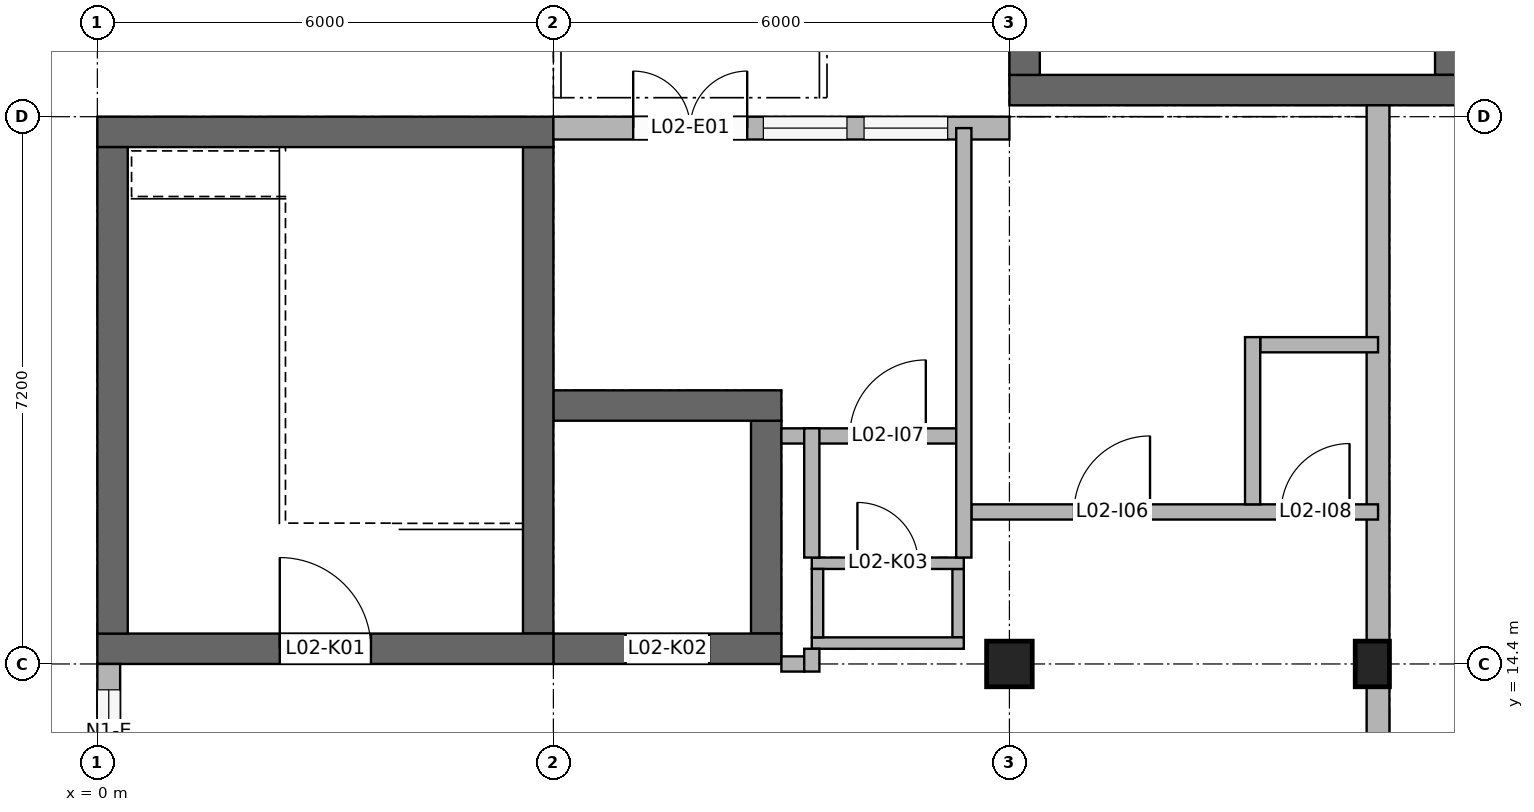
"""IFC4 building model, lengths in metres.
Left out: names, types, materials, properties, quantities, classifications, styles, units other than length and angle.
Written with IfcOpenShell. Run it as: python <this file> out.ifc"""

import sys

from ifc_helpers import new_model, si_unit, direction, frame, frame_2d, origin, origin_2d, place, context, subcontext, project, spatial, rectangle, extrude, element, fill, save


model = new_model("IFC4")
c1 = context("Model", 3, precision=1e-05, world=origin(), true_north=direction((0.0, 1.0)))
c2 = subcontext(c1, "Body", "Model", "MODEL_VIEW")
j1 = project(units=[si_unit("LENGTHUNIT", "METRE"), si_unit("PLANEANGLEUNIT", "RADIAN")], contexts=[c1])
p1 = place(None, origin())
s1 = spatial("IfcSite", under=j1, at=p1, CompositionType="ELEMENT")
p2 = place(p1, origin())
s2 = spatial("IfcBuilding", under=s1, at=p2, CompositionType="ELEMENT")
p3 = place(p2, frame((0.0, 0.0, 8.4)))
s3 = spatial("IfcBuildingStorey", under=s2, at=p3, CompositionType="ELEMENT", Elevation=8.4)
p4 = place(p3, frame((0.0, 14.6, 0.0), z_axis=(0.0, 0.0, 1.0), x_axis=(1.0, 0.0, 0.0)))
e1 = element("IfcWall", 1, at=p4, inside=s3, PredefinedType="SHEAR", context=c2, shape_type="SweptSolid", body=[
    extrude(rectangle(XDim=6.0, YDim=0.4, at=frame_2d((3.0, 0.0))), origin(), (0.0, 0.0, 1.0), 3.95),
])
p5 = place(p4, frame((2.4, 0.0, 0.0)))
e2 = element("IfcOpeningElement", 2, at=p5, cuts=e1, PredefinedType="OPENING", context=c2, shape_type="SweptSolid", body=[
    extrude(rectangle(XDim=1.2, YDim=2.1, at=frame_2d((0.6, 1.05))), frame((0.0, 0.21, 0.0), z_axis=(0.0, -1.0, 0.0), x_axis=(1.0, 0.0, 0.0)), (0.0, 0.0, 1.0), 0.42),
])
p6 = place(p3, frame((0.0, 21.4, 0.0), z_axis=(0.0, 0.0, 1.0), x_axis=(1.0, 0.0, 0.0)))
e3 = element("IfcWall", 3, at=p6, inside=s3, PredefinedType="SHEAR", context=c2, shape_type="SweptSolid", body=[
    extrude(rectangle(XDim=6.0, YDim=0.4, at=frame_2d((3.0, 0.0))), origin(), (0.0, 0.0, 1.0), 3.95),
])
for number, where, z_axis, x_axis in (
    (4, (0.2, 14.8, 0.0), (0.0, 0.0, 1.0), (0.0, 1.0, 0.0)),
    (5, (5.8, 14.8, 0.0), (0.0, 0.0, 1.0), (0.0, 1.0, 0.0)),
):
    element("IfcWall", number, at=place(p3, frame(where, z_axis=z_axis, x_axis=x_axis)), inside=s3, PredefinedType="SHEAR", context=c2, shape_type="SweptSolid", body=[
        extrude(rectangle(XDim=6.4, YDim=0.4, at=frame_2d((3.2, 0.0))), origin(), (0.0, 0.0, 1.0), 3.95),
    ])
p7 = place(p3, frame((6.0, 14.6, 0.0), z_axis=(0.0, 0.0, 1.0), x_axis=(1.0, 0.0, 0.0)))
e6 = element("IfcWall", 6, at=p7, inside=s3, PredefinedType="SHEAR", context=c2, shape_type="SweptSolid", body=[
    extrude(rectangle(XDim=3.0, YDim=0.4, at=frame_2d((1.5, 0.0))), origin(), (0.0, 0.0, 1.0), 5.75),
])
p8 = place(p7, frame((0.95, 0.0, 0.0)))
e7 = element("IfcOpeningElement", 7, at=p8, cuts=e6, PredefinedType="OPENING", context=c2, shape_type="SweptSolid", body=[
    extrude(rectangle(XDim=1.1, YDim=2.1, at=frame_2d((0.55, 1.05))), frame((0.0, 0.21, 0.0), z_axis=(0.0, -1.0, 0.0), x_axis=(1.0, 0.0, 0.0)), (0.0, 0.0, 1.0), 0.42),
])
p9 = place(p3, frame((6.0, 17.8, 0.0), z_axis=(0.0, 0.0, 1.0), x_axis=(1.0, 0.0, 0.0)))
e8 = element("IfcWall", 8, at=p9, inside=s3, PredefinedType="SHEAR", context=c2, shape_type="SweptSolid", body=[
    extrude(rectangle(XDim=3.0, YDim=0.4, at=frame_2d((1.5, 0.0))), origin(), (0.0, 0.0, 1.0), 5.75),
])
p10 = place(p3, frame((8.8, 14.8, 0.0), z_axis=(0.0, 0.0, 1.0), x_axis=(0.0, 1.0, 0.0)))
e9 = element("IfcWall", 9, at=p10, inside=s3, PredefinedType="SHEAR", context=c2, shape_type="SweptSolid", body=[
    extrude(rectangle(XDim=2.8, YDim=0.4, at=frame_2d((1.4, 0.0))), origin(), (0.0, 0.0, 1.0), 5.75),
])
p11 = place(p3, frame((12.0, 21.95, 0.0), z_axis=(0.0, 0.0, 1.0), x_axis=(1.0, 0.0, 0.0)))
e10 = element("IfcWall", 10, at=p11, inside=s3, PredefinedType="SHEAR", context=c2, shape_type="SweptSolid", body=[
    extrude(rectangle(XDim=6.0, YDim=0.4, at=frame_2d((3.0, 0.0))), origin(), (0.0, 0.0, 1.0), 3.78),
])
p12 = place(p3, frame((12.2, 22.15, 0.0), z_axis=(0.0, 0.0, 1.0), x_axis=(0.0, 1.0, 0.0)))
e11 = element("IfcWall", 11, at=p12, inside=s3, PredefinedType="SHEAR", context=c2, shape_type="SweptSolid", body=[
    extrude(rectangle(XDim=6.25, YDim=0.4, at=frame_2d((3.125, 0.0))), origin(), (0.0, 0.0, 1.0), 3.78),
])
p13 = place(p3, frame((17.8, 22.15, 0.0), z_axis=(0.0, 0.0, 1.0), x_axis=(0.0, 1.0, 0.0)))
e12 = element("IfcWall", 12, at=p13, inside=s3, PredefinedType="SHEAR", context=c2, shape_type="SweptSolid", body=[
    extrude(rectangle(XDim=6.25, YDim=0.4, at=frame_2d((3.125, 0.0))), origin(), (0.0, 0.0, 1.0), 3.78),
])
p14 = place(p13, frame((0.975, 0.0, 0.0)))
e13 = element("IfcOpeningElement", 13, at=p14, cuts=e12, PredefinedType="OPENING", context=c2, shape_type="SweptSolid", body=[
    extrude(rectangle(XDim=1.2, YDim=2.1, at=frame_2d((0.6, 1.05))), frame((0.0, 0.21, 0.0), z_axis=(0.0, -1.0, 0.0), x_axis=(1.0, 0.0, 0.0)), (0.0, 0.0, 1.0), 0.42),
])
p15 = place(p3, frame((9.4, 14.675, 0.0), z_axis=(0.0, 0.0, 1.0), x_axis=(1.0, 0.0, 0.0)))
e14 = element("IfcWall", 14, at=p15, inside=s3, PredefinedType="SOLIDWALL", context=c2, shape_type="SweptSolid", body=[
    extrude(rectangle(XDim=2.0, YDim=0.15, at=frame_2d((1.0, 0.0))), origin(), (0.0, 0.0, 1.0), 3.95),
])
p16 = place(p3, frame((9.4, 15.725, 0.0), z_axis=(0.0, 0.0, 1.0), x_axis=(1.0, 0.0, 0.0)))
e15 = element("IfcWall", 15, at=p16, inside=s3, PredefinedType="SOLIDWALL", context=c2, shape_type="SweptSolid", body=[
    extrude(rectangle(XDim=2.0, YDim=0.15, at=frame_2d((1.0, 0.0))), origin(), (0.0, 0.0, 1.0), 3.95),
])
p17 = place(p16, frame((0.6, 0.0, 0.0)))
e16 = element("IfcOpeningElement", 16, at=p17, cuts=e15, PredefinedType="OPENING", context=c2, shape_type="SweptSolid", body=[
    extrude(rectangle(XDim=0.8, YDim=2.1, at=frame_2d((0.4, 1.05))), frame((0.0, 0.085, 0.0), z_axis=(0.0, -1.0, 0.0), x_axis=(1.0, 0.0, 0.0)), (0.0, 0.0, 1.0), 0.17),
])
for number, where, z_axis, x_axis in (
    (17, (9.475, 14.75, 0.0), (0.0, 0.0, 1.0), (0.0, 1.0, 0.0)),
    (18, (11.325, 14.75, 0.0), (0.0, 0.0, 1.0), (0.0, 1.0, 0.0)),
):
    element("IfcWall", number, at=place(p3, frame(where, z_axis=z_axis, x_axis=x_axis)), inside=s3, PredefinedType="SOLIDWALL", context=c2, shape_type="SweptSolid", body=[
        extrude(rectangle(XDim=0.9, YDim=0.15, at=frame_2d((0.45, 0.0))), origin(), (0.0, 0.0, 1.0), 3.95),
    ])
p18 = place(p3, frame((12.0, 14.4, 0.0), z_axis=(0.0, 0.0, 1.0), x_axis=(1.0, 0.0, 0.0)))
e19 = element("IfcColumn", 19, at=p18, inside=s3, PredefinedType="COLUMN", context=c2, shape_type="SweptSolid", body=[
    extrude(rectangle(XDim=0.6, YDim=0.6, at=origin_2d()), origin(), (0.0, 0.0, 1.0), 3.95),
])
p19 = place(p3, frame((16.775, 14.4, 0.0), z_axis=(0.0, 0.0, 1.0), x_axis=(1.0, 0.0, 0.0)))
e20 = element("IfcColumn", 20, at=p19, inside=s3, PredefinedType="COLUMN", context=c2, shape_type="SweptSolid", body=[
    extrude(rectangle(XDim=0.45, YDim=0.6, at=origin_2d()), origin(), (0.0, 0.0, 1.0), 3.95),
])
p20 = place(p3, frame((0.15, 7.5, 0.0), z_axis=(0.0, 0.0, 1.0), x_axis=(0.0, 1.0, 0.0)))
e21 = element("IfcWall", 21, at=p20, inside=s3, PredefinedType="SOLIDWALL", context=c2, shape_type="SweptSolid", body=[
    extrude(rectangle(XDim=6.9, YDim=0.3, at=frame_2d((3.45, 0.0))), origin(), (0.0, 0.0, 1.0), 3.05),
])
p21 = place(p20, frame((0.283, 0.0, 0.9)))
e22 = element("IfcOpeningElement", 22, at=p21, cuts=e21, PredefinedType="OPENING", context=c2, shape_type="SweptSolid", body=[
    extrude(rectangle(XDim=1.1, YDim=1.5, at=frame_2d((0.55, 0.75))), frame((0.0, 0.16, 0.0), z_axis=(0.0, -1.0, 0.0), x_axis=(1.0, 0.0, 0.0)), (0.0, 0.0, 1.0), 0.32),
])
p22 = place(p20, frame((1.95, 0.0, 0.9)))
e23 = element("IfcOpeningElement", 23, at=p22, cuts=e21, PredefinedType="OPENING", context=c2, shape_type="SweptSolid", body=[
    extrude(rectangle(XDim=1.1, YDim=1.5, at=frame_2d((0.55, 0.75))), frame((0.0, 0.16, 0.0), z_axis=(0.0, -1.0, 0.0), x_axis=(1.0, 0.0, 0.0)), (0.0, 0.0, 1.0), 0.32),
])
p23 = place(p20, frame((3.617, 0.0, 0.9)))
e24 = element("IfcOpeningElement", 24, at=p23, cuts=e21, PredefinedType="OPENING", context=c2, shape_type="SweptSolid", body=[
    extrude(rectangle(XDim=1.1, YDim=1.5, at=frame_2d((0.55, 0.75))), frame((0.0, 0.16, 0.0), z_axis=(0.0, -1.0, 0.0), x_axis=(1.0, 0.0, 0.0)), (0.0, 0.0, 1.0), 0.32),
])
p24 = place(p20, frame((5.46, 0.0, 0.9)))
e25 = element("IfcOpeningElement", 25, at=p24, cuts=e21, PredefinedType="OPENING", context=c2, shape_type="SweptSolid", body=[
    extrude(rectangle(XDim=1.1, YDim=1.5, at=frame_2d((0.55, 0.75))), frame((0.0, 0.16, 0.0), z_axis=(0.0, -1.0, 0.0), x_axis=(1.0, 0.0, 0.0)), (0.0, 0.0, 1.0), 0.32),
])
p25 = place(p3, frame((16.85, 7.2, 0.0), z_axis=(0.0, 0.0, 1.0), x_axis=(0.0, 1.0, 0.0)))
e26 = element("IfcWall", 26, at=p25, inside=s3, PredefinedType="SOLIDWALL", context=c2, shape_type="SweptSolid", body=[
    extrude(rectangle(XDim=6.9, YDim=0.3, at=frame_2d((3.45, 0.0))), origin(), (0.0, 0.0, 1.0), 3.15),
])
p26 = place(p3, frame((16.85, 14.7, 0.0), z_axis=(0.0, 0.0, 1.0), x_axis=(0.0, 1.0, 0.0)))
e27 = element("IfcWall", 27, at=p26, inside=s3, PredefinedType="SOLIDWALL", context=c2, shape_type="SweptSolid", body=[
    extrude(rectangle(XDim=7.05, YDim=0.3, at=frame_2d((3.525, 0.0))), origin(), (0.0, 0.0, 1.0), 3.05),
])
p27 = place(p3, frame((6.0, 21.45, 0.0), z_axis=(0.0, 0.0, 1.0), x_axis=(1.0, 0.0, 0.0)))
e28 = element("IfcWall", 28, at=p27, inside=s3, PredefinedType="SOLIDWALL", context=c2, shape_type="SweptSolid", body=[
    extrude(rectangle(XDim=6.0, YDim=0.3, at=frame_2d((3.0, 0.0))), origin(), (0.0, 0.0, 1.0), 3.95),
])
p28 = place(p27, frame((1.05, 0.0, 0.0)))
e29 = element("IfcOpeningElement", 29, at=p28, cuts=e28, PredefinedType="OPENING", context=c2, shape_type="SweptSolid", body=[
    extrude(rectangle(XDim=1.5, YDim=2.4, at=frame_2d((0.75, 1.2))), frame((0.0, 0.16, 0.0), z_axis=(0.0, -1.0, 0.0), x_axis=(1.0, 0.0, 0.0)), (0.0, 0.0, 1.0), 0.32),
])
p29 = place(p27, frame((2.762, 0.0, 0.9)))
e30 = element("IfcOpeningElement", 30, at=p29, cuts=e28, PredefinedType="OPENING", context=c2, shape_type="SweptSolid", body=[
    extrude(rectangle(XDim=1.1, YDim=1.5, at=frame_2d((0.55, 0.75))), frame((0.0, 0.16, 0.0), z_axis=(0.0, -1.0, 0.0), x_axis=(1.0, 0.0, 0.0)), (0.0, 0.0, 1.0), 0.32),
])
p30 = place(p27, frame((4.087, 0.0, 0.9)))
e31 = element("IfcOpeningElement", 31, at=p30, cuts=e28, PredefinedType="OPENING", context=c2, shape_type="SweptSolid", body=[
    extrude(rectangle(XDim=1.1, YDim=1.5, at=frame_2d((0.55, 0.75))), frame((0.0, 0.16, 0.0), z_axis=(0.0, -1.0, 0.0), x_axis=(1.0, 0.0, 0.0)), (0.0, 0.0, 1.0), 0.32),
])
p31 = place(p3, frame((9.4, 14.3, 0.0), z_axis=(0.0, 0.0, 1.0), x_axis=(0.0, 1.0, 0.0)))
e32 = element("IfcWall", 32, at=p31, inside=s3, PredefinedType="PARTITIONING", context=c2, shape_type="SweptSolid", body=[
    extrude(rectangle(XDim=0.3, YDim=0.2, at=frame_2d((0.15, 0.0))), origin(), (0.0, 0.0, 1.0), 3.25),
])
p32 = place(p3, frame((9.4, 15.8, 0.0), z_axis=(0.0, 0.0, 1.0), x_axis=(0.0, 1.0, 0.0)))
e33 = element("IfcWall", 33, at=p32, inside=s3, PredefinedType="PARTITIONING", context=c2, shape_type="SweptSolid", body=[
    extrude(rectangle(XDim=1.7, YDim=0.2, at=frame_2d((0.85, 0.0))), origin(), (0.0, 0.0, 1.0), 3.95),
])
p33 = place(p3, frame((11.4, 15.8, 0.0), z_axis=(0.0, 0.0, 1.0), x_axis=(0.0, 1.0, 0.0)))
e34 = element("IfcWall", 34, at=p33, inside=s3, PredefinedType="PARTITIONING", context=c2, shape_type="SweptSolid", body=[
    extrude(rectangle(XDim=5.65, YDim=0.2, at=frame_2d((2.825, 0.0))), origin(), (0.0, 0.0, 1.0), 3.95),
])
p34 = place(p3, frame((15.2, 16.5, 0.0), z_axis=(0.0, 0.0, 1.0), x_axis=(0.0, 1.0, 0.0)))
e35 = element("IfcWall", 35, at=p34, inside=s3, PredefinedType="PARTITIONING", context=c2, shape_type="SweptSolid", body=[
    extrude(rectangle(XDim=2.2, YDim=0.2, at=frame_2d((1.1, 0.0))), origin(), (0.0, 0.0, 1.0), 3.95),
])
p35 = place(p3, frame((9.0, 14.4, 0.0), z_axis=(0.0, 0.0, 1.0), x_axis=(1.0, 0.0, 0.0)))
e36 = element("IfcWall", 36, at=p35, inside=s3, PredefinedType="PARTITIONING", context=c2, shape_type="SweptSolid", body=[
    extrude(rectangle(XDim=0.3, YDim=0.2, at=frame_2d((0.15, 0.0))), origin(), (0.0, 0.0, 1.0), 3.25),
])
p36 = place(p3, frame((11.5, 16.4, 0.0), z_axis=(0.0, 0.0, 1.0), x_axis=(1.0, 0.0, 0.0)))
e37 = element("IfcWall", 37, at=p36, inside=s3, PredefinedType="PARTITIONING", context=c2, shape_type="SweptSolid", body=[
    extrude(rectangle(XDim=5.35, YDim=0.2, at=frame_2d((2.675, 0.0))), origin(), (0.0, 0.0, 1.0), 3.05),
])
p37 = place(p36, frame((1.35, 0.0, 0.0)))
e38 = element("IfcOpeningElement", 38, at=p37, cuts=e37, PredefinedType="OPENING", context=c2, shape_type="SweptSolid", body=[
    extrude(rectangle(XDim=1.0, YDim=2.1, at=frame_2d((0.5, 1.05))), frame((0.0, 0.11, 0.0), z_axis=(0.0, -1.0, 0.0), x_axis=(1.0, 0.0, 0.0)), (0.0, 0.0, 1.0), 0.22),
])
p38 = place(p36, frame((4.075, 0.0, 0.0)))
e39 = element("IfcOpeningElement", 39, at=p38, cuts=e37, PredefinedType="OPENING", context=c2, shape_type="SweptSolid", body=[
    extrude(rectangle(XDim=0.9, YDim=2.1, at=frame_2d((0.45, 1.05))), frame((0.0, 0.11, 0.0), z_axis=(0.0, -1.0, 0.0), x_axis=(1.0, 0.0, 0.0)), (0.0, 0.0, 1.0), 0.22),
])
p39 = place(p3, frame((9.0, 17.4, 0.0), z_axis=(0.0, 0.0, 1.0), x_axis=(1.0, 0.0, 0.0)))
e40 = element("IfcWall", 40, at=p39, inside=s3, PredefinedType="PARTITIONING", context=c2, shape_type="SweptSolid", body=[
    extrude(rectangle(XDim=2.3, YDim=0.2, at=frame_2d((1.15, 0.0))), origin(), (0.0, 0.0, 1.0), 3.95),
])
p40 = place(p39, frame((0.9, 0.0, 0.0)))
e41 = element("IfcOpeningElement", 41, at=p40, cuts=e40, PredefinedType="OPENING", context=c2, shape_type="SweptSolid", body=[
    extrude(rectangle(XDim=1.0, YDim=2.1, at=frame_2d((0.5, 1.05))), frame((0.0, 0.11, 0.0), z_axis=(0.0, -1.0, 0.0), x_axis=(1.0, 0.0, 0.0)), (0.0, 0.0, 1.0), 0.22),
])
p41 = place(p3, frame((15.3, 18.6, 0.0), z_axis=(0.0, 0.0, 1.0), x_axis=(1.0, 0.0, 0.0)))
e42 = element("IfcWall", 42, at=p41, inside=s3, PredefinedType="PARTITIONING", context=c2, shape_type="SweptSolid", body=[
    extrude(rectangle(XDim=1.55, YDim=0.2, at=frame_2d((0.775, 0.0))), origin(), (0.0, 0.0, 1.0), 3.05),
])
p42 = place(p24, origin())
e43 = element("IfcWindow", 43, at=p42, inside=s3, PartitioningType="SINGLE_PANEL", PredefinedType="WINDOW", context=c2, shape_type="SweptSolid", body=[
    extrude(rectangle(XDim=1.1, YDim=1.5, at=frame_2d((0.55, 0.75))), frame((0.0, 0.03, 0.0), z_axis=(0.0, -1.0, 0.0), x_axis=(1.0, 0.0, 0.0)), (0.0, 0.0, 1.0), 0.06),
])
fill(e25, e43)
p43 = place(p28, origin())
e44 = element("IfcDoor", 44, at=p43, inside=s3, OperationType="DOUBLE_DOOR_SINGLE_SWING", PredefinedType="DOOR", context=c2, shape_type="SweptSolid", body=[
    extrude(rectangle(XDim=1.5, YDim=2.4, at=frame_2d((0.75, 1.2))), frame((0.0, 0.025, 0.0), z_axis=(0.0, -1.0, 0.0), x_axis=(1.0, 0.0, 0.0)), (0.0, 0.0, 1.0), 0.05),
])
fill(e29, e44)
p44 = place(p29, origin())
e45 = element("IfcWindow", 45, at=p44, inside=s3, PartitioningType="SINGLE_PANEL", PredefinedType="WINDOW", context=c2, shape_type="SweptSolid", body=[
    extrude(rectangle(XDim=1.1, YDim=1.5, at=frame_2d((0.55, 0.75))), frame((0.0, 0.03, 0.0), z_axis=(0.0, -1.0, 0.0), x_axis=(1.0, 0.0, 0.0)), (0.0, 0.0, 1.0), 0.06),
])
fill(e30, e45)
p45 = place(p30, origin())
e46 = element("IfcWindow", 46, at=p45, inside=s3, PartitioningType="SINGLE_PANEL", PredefinedType="WINDOW", context=c2, shape_type="SweptSolid", body=[
    extrude(rectangle(XDim=1.1, YDim=1.5, at=frame_2d((0.55, 0.75))), frame((0.0, 0.03, 0.0), z_axis=(0.0, -1.0, 0.0), x_axis=(1.0, 0.0, 0.0)), (0.0, 0.0, 1.0), 0.06),
])
fill(e31, e46)
p46 = place(p5, origin())
e47 = element("IfcDoor", 47, at=p46, inside=s3, OperationType="SINGLE_SWING_LEFT", PredefinedType="DOOR", context=c2, shape_type="SweptSolid", body=[
    extrude(rectangle(XDim=1.2, YDim=2.1, at=frame_2d((0.6, 1.05))), frame((0.0, 0.025, 0.0), z_axis=(0.0, -1.0, 0.0), x_axis=(1.0, 0.0, 0.0)), (0.0, 0.0, 1.0), 0.05),
])
fill(e2, e47)
p47 = place(p8, origin())
e48 = element("IfcDoor", 48, at=p47, inside=s3, OperationType="DOUBLE_DOOR_SLIDING", PredefinedType="DOOR", context=c2, shape_type="SweptSolid", body=[
    extrude(rectangle(XDim=1.1, YDim=2.1, at=frame_2d((0.55, 1.05))), frame((0.0, 0.025, 0.0), z_axis=(0.0, -1.0, 0.0), x_axis=(1.0, 0.0, 0.0)), (0.0, 0.0, 1.0), 0.05),
])
fill(e7, e48)
p48 = place(p17, origin())
e49 = element("IfcDoor", 49, at=p48, inside=s3, OperationType="SINGLE_SWING_LEFT", PredefinedType="DOOR", context=c2, shape_type="SweptSolid", body=[
    extrude(rectangle(XDim=0.8, YDim=2.1, at=frame_2d((0.4, 1.05))), frame((0.0, 0.025, 0.0), z_axis=(0.0, -1.0, 0.0), x_axis=(1.0, 0.0, 0.0)), (0.0, 0.0, 1.0), 0.05),
])
fill(e16, e49)
p49 = place(p37, origin())
e50 = element("IfcDoor", 50, at=p49, inside=s3, OperationType="SINGLE_SWING_RIGHT", PredefinedType="DOOR", context=c2, shape_type="SweptSolid", body=[
    extrude(rectangle(XDim=1.0, YDim=2.1, at=frame_2d((0.5, 1.05))), frame((0.0, 0.025, 0.0), z_axis=(0.0, -1.0, 0.0), x_axis=(1.0, 0.0, 0.0)), (0.0, 0.0, 1.0), 0.05),
])
fill(e38, e50)
p50 = place(p40, origin())
e51 = element("IfcDoor", 51, at=p50, inside=s3, OperationType="SINGLE_SWING_RIGHT", PredefinedType="DOOR", context=c2, shape_type="SweptSolid", body=[
    extrude(rectangle(XDim=1.0, YDim=2.1, at=frame_2d((0.5, 1.05))), frame((0.0, 0.025, 0.0), z_axis=(0.0, -1.0, 0.0), x_axis=(1.0, 0.0, 0.0)), (0.0, 0.0, 1.0), 0.05),
])
fill(e41, e51)
p51 = place(p38, origin())
e52 = element("IfcDoor", 52, at=p51, inside=s3, OperationType="SINGLE_SWING_RIGHT", PredefinedType="DOOR", context=c2, shape_type="SweptSolid", body=[
    extrude(rectangle(XDim=0.9, YDim=2.1, at=frame_2d((0.45, 1.05))), frame((0.0, 0.025, 0.0), z_axis=(0.0, -1.0, 0.0), x_axis=(1.0, 0.0, 0.0)), (0.0, 0.0, 1.0), 0.05),
])
fill(e39, e52)
save(model, sys.argv[1])
